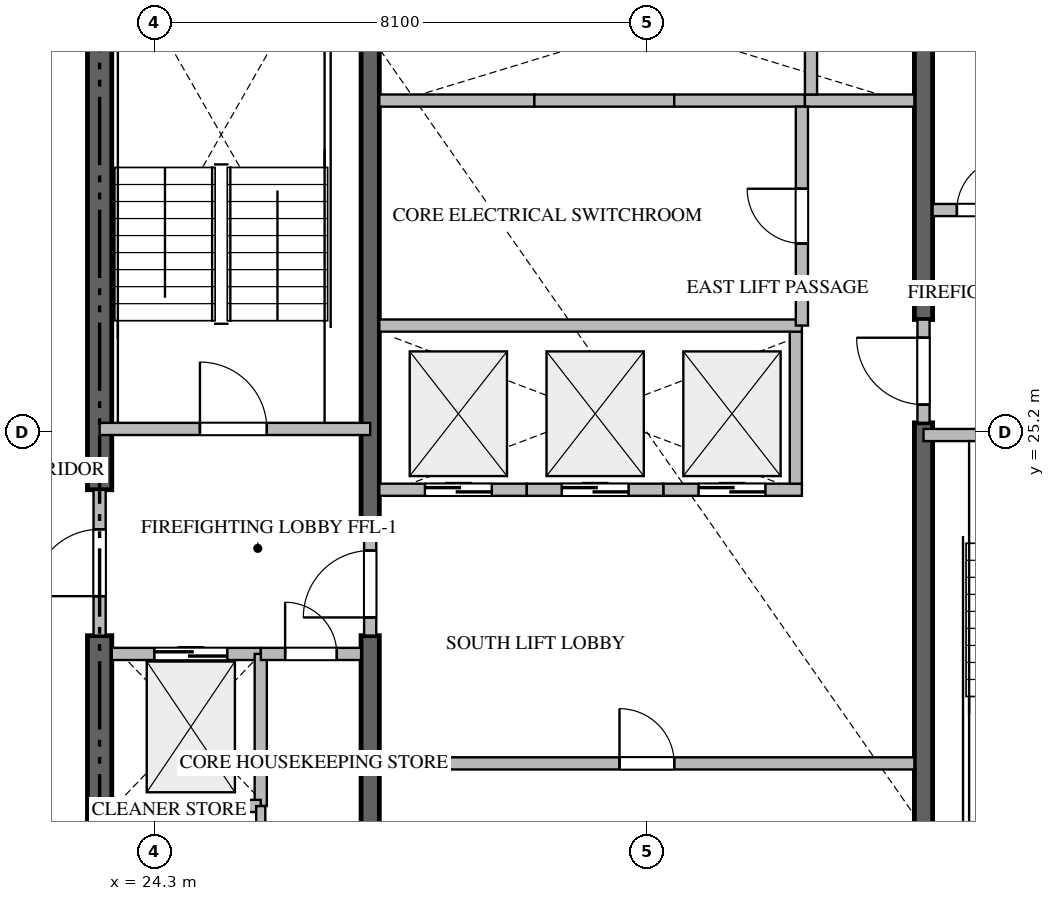
"""IFC4 building model, lengths in metres.
Left out: names, types, materials, properties, quantities, classifications, styles, units other than length and angle.
Written with IfcOpenShell. Run it as: python <this file> out.ifc"""

import sys

from ifc_helpers import new_model, si_unit, direction, frame, frame_2d, origin, place, context, subcontext, project, spatial, rectangle, extrude, source, transform, mapped, element, fill, save


model = new_model("IFC4")
c1 = context("Model", 3, precision=1e-05, world=origin(), true_north=direction((0.0, 1.0)))
c2 = subcontext(c1, "Body", "Model", "MODEL_VIEW")
j1 = project(units=[si_unit("LENGTHUNIT", "METRE"), si_unit("PLANEANGLEUNIT", "RADIAN")], contexts=[c1])
p1 = place(None, origin())
s1 = spatial("IfcSite", under=j1, at=p1, CompositionType="ELEMENT")
p2 = place(p1, origin())
s2 = spatial("IfcBuilding", under=s1, at=p2, CompositionType="ELEMENT")
p3 = place(p2, frame((0.0, 0.0, 127.65)))
s3 = spatial("IfcBuildingStorey", under=s2, at=p3, CompositionType="ELEMENT", Elevation=127.65)
p4 = place(p3, frame((23.4, 17.0, -0.26), z_axis=(0.0, 0.0, 1.0), x_axis=(0.0, 1.0, 0.0)))
e1 = element("IfcWall", 1, at=p4, inside=s3, PredefinedType="SHEAR", context=c2, shape_type="SweptSolid", body=[
    extrude(rectangle(XDim=4.85, YDim=0.4, at=frame_2d((2.425, 0.0))), origin(), (0.0, 0.0, 1.0), 3.748),
])
p5 = place(p3, frame((23.4, 24.25, -0.26), z_axis=(0.0, 0.0, 1.0), x_axis=(0.0, 1.0, 0.0)))
e2 = element("IfcWall", 2, at=p5, inside=s3, PredefinedType="SHEAR", context=c2, shape_type="SweptSolid", body=[
    extrude(rectangle(XDim=9.15, YDim=0.4, at=frame_2d((4.575, 0.0))), origin(), (0.0, 0.0, 1.0), 3.748),
])
p6 = place(p3, frame((27.85, 17.0, -0.26), z_axis=(0.0, 0.0, 1.0), x_axis=(0.0, 1.0, 0.0)))
e3 = element("IfcWall", 3, at=p6, inside=s3, PredefinedType="SHEAR", context=c2, shape_type="SweptSolid", body=[
    extrude(rectangle(XDim=4.85, YDim=0.3, at=frame_2d((2.425, 0.0))), origin(), (0.0, 0.0, 1.0), 3.748),
])
p7 = place(p3, frame((27.85, 23.55, -0.26), z_axis=(0.0, 0.0, 1.0), x_axis=(0.0, 1.0, 0.0)))
e4 = element("IfcWall", 4, at=p7, inside=s3, PredefinedType="SHEAR", context=c2, shape_type="SweptSolid", body=[
    extrude(rectangle(XDim=9.85, YDim=0.3, at=frame_2d((4.925, 0.0))), origin(), (0.0, 0.0, 1.0), 3.748),
])
p8 = place(p3, frame((36.95, 17.0, -0.26), z_axis=(0.0, 0.0, 1.0), x_axis=(0.0, 1.0, 0.0)))
e5 = element("IfcWall", 5, at=p8, inside=s3, PredefinedType="SHEAR", context=c2, shape_type="SweptSolid", body=[
    extrude(rectangle(XDim=8.35, YDim=0.3, at=frame_2d((4.175, 0.0))), origin(), (0.0, 0.0, 1.0), 3.748),
])
p9 = place(p3, frame((36.95, 27.05, -0.26), z_axis=(0.0, 0.0, 1.0), x_axis=(0.0, 1.0, 0.0)))
e6 = element("IfcWall", 6, at=p9, inside=s3, PredefinedType="SHEAR", context=c2, shape_type="SweptSolid", body=[
    extrude(rectangle(XDim=6.35, YDim=0.3, at=frame_2d((3.175, 0.0))), origin(), (0.0, 0.0, 1.0), 3.748),
])
p10 = place(p3, frame((23.4, 25.25, 0.0), z_axis=(0.0, 0.0, 1.0), x_axis=(1.0, 0.0, 0.0)))
e7 = element("IfcWall", 7, at=p10, inside=s3, PredefinedType="STANDARD", context=c2, shape_type="SweptSolid", body=[
    extrude(rectangle(XDim=4.45, YDim=0.2, at=frame_2d((2.225, 0.0))), origin(), (0.0, 0.0, 1.0), 3.49),
])
p11 = place(p10, frame((1.65, 0.0, 0.0)))
e8 = element("IfcOpeningElement", 8, at=p11, cuts=e7, PredefinedType="OPENING", context=c2, shape_type="SweptSolid", body=[
    extrude(rectangle(XDim=1.1, YDim=2.15, at=frame_2d((0.55, 1.075))), frame((0.0, 0.11, 0.0), z_axis=(0.0, -1.0, 0.0), x_axis=(1.0, 0.0, 0.0)), (0.0, 0.0, 1.0), 0.22),
])
p12 = place(p3, frame((36.95, 25.15, 0.0), z_axis=(0.0, 0.0, 1.0), x_axis=(1.0, 0.0, 0.0)))
e9 = element("IfcWall", 9, at=p12, inside=s3, PredefinedType="STANDARD", context=c2, shape_type="SweptSolid", body=[
    extrude(rectangle(XDim=4.45, YDim=0.2, at=frame_2d((2.225, 0.0))), origin(), (0.0, 0.0, 1.0), 3.49),
])
p13 = place(p12, frame((1.65, 0.0, 0.0)))
e10 = element("IfcOpeningElement", 10, at=p13, cuts=e9, PredefinedType="OPENING", context=c2, shape_type="SweptSolid", body=[
    extrude(rectangle(XDim=1.1, YDim=2.15, at=frame_2d((0.55, 1.075))), frame((0.0, 0.11, 0.0), z_axis=(0.0, -1.0, 0.0), x_axis=(1.0, 0.0, 0.0)), (0.0, 0.0, 1.0), 0.22),
])
p14 = place(p3, frame((23.6, 21.55, 0.0), z_axis=(0.0, 0.0, 1.0), x_axis=(1.0, 0.0, 0.0)))
e11 = element("IfcWall", 11, at=p14, inside=s3, PredefinedType="STANDARD", context=c2, shape_type="SweptSolid", body=[
    extrude(rectangle(XDim=2.45, YDim=0.2, at=frame_2d((1.225, 0.0))), origin(), (0.0, 0.0, 1.0), 3.49),
])
p15 = place(p14, frame((0.7, 0.0, 0.0)))
e12 = element("IfcOpeningElement", 12, at=p15, cuts=e11, PredefinedType="OPENING", context=c2, shape_type="SweptSolid", body=[
    extrude(rectangle(XDim=1.2, YDim=2.2, at=frame_2d((0.6, 1.1))), frame((0.0, 0.11, 0.0), z_axis=(0.0, -1.0, 0.0), x_axis=(1.0, 0.0, 0.0)), (0.0, 0.0, 1.0), 0.22),
])
p16 = place(p3, frame((28.0, 24.25, 0.0), z_axis=(0.0, 0.0, 1.0), x_axis=(1.0, 0.0, 0.0)))
e13 = element("IfcWall", 13, at=p16, inside=s3, PredefinedType="STANDARD", context=c2, shape_type="SweptSolid", body=[
    extrude(rectangle(XDim=2.425, YDim=0.2, at=frame_2d((1.212, 0.0))), origin(), (0.0, 0.0, 1.0), 3.49),
])
p17 = place(p16, frame((0.75, 0.0, 0.0)))
e14 = element("IfcOpeningElement", 14, at=p17, cuts=e13, PredefinedType="OPENING", context=c2, shape_type="SweptSolid", body=[
    extrude(rectangle(XDim=1.1, YDim=2.2, at=frame_2d((0.55, 1.1))), frame((0.0, 0.11, 0.0), z_axis=(0.0, -1.0, 0.0), x_axis=(1.0, 0.0, 0.0)), (0.0, 0.0, 1.0), 0.22),
])
p18 = place(p3, frame((30.425, 24.25, 0.0), z_axis=(0.0, 0.0, 1.0), x_axis=(1.0, 0.0, 0.0)))
e15 = element("IfcWall", 15, at=p18, inside=s3, PredefinedType="STANDARD", context=c2, shape_type="SweptSolid", body=[
    extrude(rectangle(XDim=2.25, YDim=0.2, at=frame_2d((1.125, 0.0))), origin(), (0.0, 0.0, 1.0), 3.49),
])
p19 = place(p18, frame((0.575, 0.0, 0.0)))
e16 = element("IfcOpeningElement", 16, at=p19, cuts=e15, PredefinedType="OPENING", context=c2, shape_type="SweptSolid", body=[
    extrude(rectangle(XDim=1.1, YDim=2.2, at=frame_2d((0.55, 1.1))), frame((0.0, 0.11, 0.0), z_axis=(0.0, -1.0, 0.0), x_axis=(1.0, 0.0, 0.0)), (0.0, 0.0, 1.0), 0.22),
])
p20 = place(p3, frame((32.675, 24.25, 0.0), z_axis=(0.0, 0.0, 1.0), x_axis=(1.0, 0.0, 0.0)))
e17 = element("IfcWall", 17, at=p20, inside=s3, PredefinedType="STANDARD", context=c2, shape_type="SweptSolid", body=[
    extrude(rectangle(XDim=2.275, YDim=0.2, at=frame_2d((1.137, 0.0))), origin(), (0.0, 0.0, 1.0), 3.49),
])
p21 = place(p20, frame((0.575, 0.0, 0.0)))
e18 = element("IfcOpeningElement", 18, at=p21, cuts=e17, PredefinedType="OPENING", context=c2, shape_type="SweptSolid", body=[
    extrude(rectangle(XDim=1.1, YDim=2.2, at=frame_2d((0.55, 1.1))), frame((0.0, 0.11, 0.0), z_axis=(0.0, -1.0, 0.0), x_axis=(1.0, 0.0, 0.0)), (0.0, 0.0, 1.0), 0.22),
])
p22 = place(p3, frame((34.85, 24.35, 0.0), z_axis=(0.0, 0.0, 1.0), x_axis=(0.0, 1.0, 0.0)))
e19 = element("IfcWall", 19, at=p22, inside=s3, PredefinedType="STANDARD", context=c2, shape_type="SweptSolid", body=[
    extrude(rectangle(XDim=2.5, YDim=0.2, at=frame_2d((1.25, 0.0))), origin(), (0.0, 0.0, 1.0), 3.49),
])
p23 = place(p3, frame((28.0, 30.65, 0.0), z_axis=(0.0, 0.0, 1.0), x_axis=(1.0, 0.0, 0.0)))
e20 = element("IfcWall", 20, at=p23, inside=s3, PredefinedType="STANDARD", context=c2, shape_type="SweptSolid", body=[
    extrude(rectangle(XDim=2.55, YDim=0.2, at=frame_2d((1.275, 0.0))), origin(), (0.0, 0.0, 1.0), 3.49),
])
p24 = place(p3, frame((30.55, 30.65, 0.0), z_axis=(0.0, 0.0, 1.0), x_axis=(1.0, 0.0, 0.0)))
e21 = element("IfcWall", 21, at=p24, inside=s3, PredefinedType="STANDARD", context=c2, shape_type="SweptSolid", body=[
    extrude(rectangle(XDim=2.3, YDim=0.2, at=frame_2d((1.15, 0.0))), origin(), (0.0, 0.0, 1.0), 3.49),
])
p25 = place(p3, frame((32.85, 30.65, 0.0), z_axis=(0.0, 0.0, 1.0), x_axis=(1.0, 0.0, 0.0)))
e22 = element("IfcWall", 22, at=p25, inside=s3, PredefinedType="STANDARD", context=c2, shape_type="SweptSolid", body=[
    extrude(rectangle(XDim=2.15, YDim=0.2, at=frame_2d((1.075, 0.0))), origin(), (0.0, 0.0, 1.0), 3.49),
])
p26 = place(p3, frame((35.0, 30.65, 0.0), z_axis=(0.0, 0.0, 1.0), x_axis=(1.0, 0.0, 0.0)))
e23 = element("IfcWall", 23, at=p26, inside=s3, PredefinedType="STANDARD", context=c2, shape_type="SweptSolid", body=[
    extrude(rectangle(XDim=1.8, YDim=0.2, at=frame_2d((0.9, 0.0))), origin(), (0.0, 0.0, 1.0), 3.49),
])
p27 = place(p3, frame((35.1, 30.75, 0.0), z_axis=(0.0, 0.0, 1.0), x_axis=(0.0, 1.0, 0.0)))
e24 = element("IfcWall", 24, at=p27, inside=s3, PredefinedType="STANDARD", context=c2, shape_type="SweptSolid", body=[
    extrude(rectangle(XDim=2.65, YDim=0.2, at=frame_2d((1.325, 0.0))), origin(), (0.0, 0.0, 1.0), 3.49),
])
p28 = place(p3, frame((26.05, 19.05, 0.0), z_axis=(0.0, 0.0, 1.0), x_axis=(0.0, 1.0, 0.0)))
e25 = element("IfcWall", 25, at=p28, inside=s3, PredefinedType="STANDARD", context=c2, shape_type="SweptSolid", body=[
    extrude(rectangle(XDim=2.5, YDim=0.2, at=frame_2d((1.25, 0.0))), origin(), (0.0, 0.0, 1.0), 3.49),
])
p29 = place(p3, frame((23.6, 19.05, 0.0), z_axis=(0.0, 0.0, 1.0), x_axis=(1.0, 0.0, 0.0)))
e26 = element("IfcWall", 26, at=p29, inside=s3, PredefinedType="STANDARD", context=c2, shape_type="SweptSolid", body=[
    extrude(rectangle(XDim=2.45, YDim=0.2, at=frame_2d((1.225, 0.0))), origin(), (0.0, 0.0, 1.0), 3.49),
])
p30 = place(p3, frame((26.052, 21.55, 0.0), z_axis=(0.0, 0.0, 1.0), x_axis=(1.0, 0.0, 0.0)))
e27 = element("IfcWall", 27, at=p30, inside=s3, PredefinedType="STANDARD", context=c2, shape_type="SweptSolid", body=[
    extrude(rectangle(XDim=1.648, YDim=0.2, at=frame_2d((0.824, 0.0))), origin(), (0.0, 0.0, 1.0), 3.49),
])
p31 = place(p30, frame((0.399, 0.0, 0.0)))
e28 = element("IfcOpeningElement", 28, at=p31, cuts=e27, PredefinedType="OPENING", context=c2, shape_type="SweptSolid", body=[
    extrude(rectangle(XDim=0.85, YDim=2.1, at=frame_2d((0.425, 1.05))), frame((0.0, 0.11, 0.0), z_axis=(0.0, -1.0, 0.0), x_axis=(1.0, 0.0, 0.0)), (0.0, 0.0, 1.0), 0.22),
])
p32 = place(p3, frame((37.1, 28.85, 0.0), z_axis=(0.0, 0.0, 1.0), x_axis=(1.0, 0.0, 0.0)))
e29 = element("IfcWall", 29, at=p32, inside=s3, PredefinedType="STANDARD", context=c2, shape_type="SweptSolid", body=[
    extrude(rectangle(XDim=1.648, YDim=0.2, at=frame_2d((0.824, 0.0))), origin(), (0.0, 0.0, 1.0), 3.49),
])
p33 = place(p32, frame((0.399, 0.0, 0.0)))
e30 = element("IfcOpeningElement", 30, at=p33, cuts=e29, PredefinedType="OPENING", context=c2, shape_type="SweptSolid", body=[
    extrude(rectangle(XDim=0.85, YDim=2.1, at=frame_2d((0.425, 1.05))), frame((0.0, 0.11, 0.0), z_axis=(0.0, -1.0, 0.0), x_axis=(1.0, 0.0, 0.0)), (0.0, 0.0, 1.0), 0.22),
])
p34 = place(p3, frame((23.4, 21.852, 0.0), z_axis=(0.0, 0.0, 1.0), x_axis=(0.0, 1.0, 0.0)))
e31 = element("IfcWall", 31, at=p34, inside=s3, PredefinedType="STANDARD", context=c2, shape_type="SweptSolid", body=[
    extrude(rectangle(XDim=2.396, YDim=0.2, at=frame_2d((1.198, 0.0))), origin(), (0.0, 0.0, 1.0), 3.49),
])
p35 = place(p34, frame((0.648, 0.0, 0.0)))
e32 = element("IfcOpeningElement", 32, at=p35, cuts=e31, PredefinedType="OPENING", context=c2, shape_type="SweptSolid", body=[
    extrude(rectangle(XDim=1.1, YDim=2.15, at=frame_2d((0.55, 1.075))), frame((0.0, 0.11, 0.0), z_axis=(0.0, -1.0, 0.0), x_axis=(1.0, 0.0, 0.0)), (0.0, 0.0, 1.0), 0.22),
])
p36 = place(p3, frame((27.85, 21.852, 0.0), z_axis=(0.0, 0.0, 1.0), x_axis=(0.0, 1.0, 0.0)))
e33 = element("IfcWall", 33, at=p36, inside=s3, PredefinedType="STANDARD", context=c2, shape_type="SweptSolid", body=[
    extrude(rectangle(XDim=1.696, YDim=0.2, at=frame_2d((0.848, 0.0))), origin(), (0.0, 0.0, 1.0), 3.49),
])
p37 = place(p36, frame((0.298, 0.0, 0.0)))
e34 = element("IfcOpeningElement", 34, at=p37, cuts=e33, PredefinedType="OPENING", context=c2, shape_type="SweptSolid", body=[
    extrude(rectangle(XDim=1.1, YDim=2.15, at=frame_2d((0.55, 1.075))), frame((0.0, 0.11, 0.0), z_axis=(0.0, -1.0, 0.0), x_axis=(1.0, 0.0, 0.0)), (0.0, 0.0, 1.0), 0.22),
])
p38 = place(p3, frame((36.95, 25.352, 0.0), z_axis=(0.0, 0.0, 1.0), x_axis=(0.0, 1.0, 0.0)))
e35 = element("IfcWall", 35, at=p38, inside=s3, PredefinedType="STANDARD", context=c2, shape_type="SweptSolid", body=[
    extrude(rectangle(XDim=1.696, YDim=0.2, at=frame_2d((0.848, 0.0))), origin(), (0.0, 0.0, 1.0), 3.49),
])
p39 = place(p38, frame((0.298, 0.0, 0.0)))
e36 = element("IfcOpeningElement", 36, at=p39, cuts=e35, PredefinedType="OPENING", context=c2, shape_type="SweptSolid", body=[
    extrude(rectangle(XDim=1.1, YDim=2.15, at=frame_2d((0.55, 1.075))), frame((0.0, 0.11, 0.0), z_axis=(0.0, -1.0, 0.0), x_axis=(1.0, 0.0, 0.0)), (0.0, 0.0, 1.0), 0.22),
])
p40 = place(p3, frame((28.0, 26.95, 0.0), z_axis=(0.0, 0.0, 1.0), x_axis=(1.0, 0.0, 0.0)))
e37 = element("IfcWall", 37, at=p40, inside=s3, PredefinedType="STANDARD", context=c2, shape_type="SweptSolid", body=[
    extrude(rectangle(XDim=6.95, YDim=0.2, at=frame_2d((3.475, 0.0))), origin(), (0.0, 0.0, 1.0), 3.49),
])
p41 = place(p3, frame((26.05, 17.0, 0.0), z_axis=(0.0, 0.0, 1.0), x_axis=(0.0, 1.0, 0.0)))
e38 = element("IfcWall", 38, at=p41, inside=s3, PredefinedType="PARTITIONING", context=c2, shape_type="SweptSolid", body=[
    extrude(rectangle(XDim=2.048, YDim=0.15, at=frame_2d((1.024, 0.0))), origin(), (0.0, 0.0, 1.0), 3.49),
])
p42 = place(p41, frame((0.599, 0.0, 0.0)))
e39 = element("IfcOpeningElement", 39, at=p42, cuts=e38, PredefinedType="OPENING", context=c2, shape_type="SweptSolid", body=[
    extrude(rectangle(XDim=0.85, YDim=2.1, at=frame_2d((0.425, 1.05))), frame((0.0, 0.085, 0.0), z_axis=(0.0, -1.0, 0.0), x_axis=(1.0, 0.0, 0.0)), (0.0, 0.0, 1.0), 0.17),
])
p43 = place(p3, frame((34.95, 26.95, 0.0), z_axis=(0.0, 0.0, 1.0), x_axis=(0.0, 1.0, 0.0)))
e40 = element("IfcWall", 40, at=p43, inside=s3, PredefinedType="STANDARD", context=c2, shape_type="SweptSolid", body=[
    extrude(rectangle(XDim=3.6, YDim=0.2, at=frame_2d((1.8, 0.0))), origin(), (0.0, 0.0, 1.0), 3.49),
])
p44 = place(p43, frame((1.35, 0.0, 0.0)))
e41 = element("IfcOpeningElement", 41, at=p44, cuts=e40, PredefinedType="OPENING", context=c2, shape_type="SweptSolid", body=[
    extrude(rectangle(XDim=0.9, YDim=2.1, at=frame_2d((0.45, 1.05))), frame((0.0, 0.11, 0.0), z_axis=(0.0, -1.0, 0.0), x_axis=(1.0, 0.0, 0.0)), (0.0, 0.0, 1.0), 0.22),
])
p45 = place(p3, frame((28.0, 19.75, 0.0), z_axis=(0.0, 0.0, 1.0), x_axis=(1.0, 0.0, 0.0)))
e42 = element("IfcWall", 42, at=p45, inside=s3, PredefinedType="STANDARD", context=c2, shape_type="SweptSolid", body=[
    extrude(rectangle(XDim=8.8, YDim=0.2, at=frame_2d((4.4, 0.0))), origin(), (0.0, 0.0, 1.0), 3.49),
])
p46 = place(p45, frame((3.95, 0.0, 0.0)))
e43 = element("IfcOpeningElement", 43, at=p46, cuts=e42, PredefinedType="OPENING", context=c2, shape_type="SweptSolid", body=[
    extrude(rectangle(XDim=0.9, YDim=2.1, at=frame_2d((0.45, 1.05))), frame((0.0, 0.11, 0.0), z_axis=(0.0, -1.0, 0.0), x_axis=(1.0, 0.0, 0.0)), (0.0, 0.0, 1.0), 0.22),
])
m1 = source(origin(), c2, "Body", "SweptSolid", [
    extrude(rectangle(XDim=1.1, YDim=2.15, at=frame_2d((0.55, 1.075))), frame((0.0, 0.025, 0.0), z_axis=(0.0, -1.0, 0.0), x_axis=(1.0, 0.0, 0.0)), (0.0, 0.0, 1.0), 0.05),
])
p47 = place(p11, origin())
e44 = element("IfcDoor", 44, at=p47, inside=s3, OperationType="SINGLE_SWING_LEFT", PredefinedType="DOOR", context=c2, shape_type="MappedRepresentation", body=[
    mapped(m1, transform((0.0, 0.0, 0.0), scale=1.0)),
])
fill(e8, e44)
m2 = source(origin(), c2, "Body", "SweptSolid", [
    extrude(rectangle(XDim=1.2, YDim=2.2, at=frame_2d((0.6, 1.1))), frame((0.0, 0.025, 0.0), z_axis=(0.0, -1.0, 0.0), x_axis=(1.0, 0.0, 0.0)), (0.0, 0.0, 1.0), 0.05),
])
p48 = place(p15, origin())
e45 = element("IfcDoor", 45, at=p48, inside=s3, OperationType="DOUBLE_DOOR_SLIDING", PredefinedType="DOOR", context=c2, shape_type="MappedRepresentation", body=[
    mapped(m2, transform((0.0, 0.0, 0.0), scale=1.0)),
])
fill(e12, e45)
m3 = source(origin(), c2, "Body", "SweptSolid", [
    extrude(rectangle(XDim=1.1, YDim=2.2, at=frame_2d((0.55, 1.1))), frame((0.0, 0.025, 0.0), z_axis=(0.0, -1.0, 0.0), x_axis=(1.0, 0.0, 0.0)), (0.0, 0.0, 1.0), 0.05),
])
p49 = place(p17, origin())
e46 = element("IfcDoor", 46, at=p49, inside=s3, OperationType="DOUBLE_DOOR_SLIDING", PredefinedType="DOOR", context=c2, shape_type="MappedRepresentation", body=[
    mapped(m3, transform((0.0, 0.0, 0.0), scale=1.0)),
])
fill(e14, e46)
p50 = place(p19, origin())
e47 = element("IfcDoor", 47, at=p50, inside=s3, OperationType="DOUBLE_DOOR_SLIDING", PredefinedType="DOOR", context=c2, shape_type="MappedRepresentation", body=[
    mapped(m3, transform((0.0, 0.0, 0.0), scale=1.0)),
])
fill(e16, e47)
p51 = place(p21, origin())
e48 = element("IfcDoor", 48, at=p51, inside=s3, OperationType="DOUBLE_DOOR_SLIDING", PredefinedType="DOOR", context=c2, shape_type="MappedRepresentation", body=[
    mapped(m3, transform((0.0, 0.0, 0.0), scale=1.0)),
])
fill(e18, e48)
m4 = source(origin(), c2, "Body", "SweptSolid", [
    extrude(rectangle(XDim=0.85, YDim=2.1, at=frame_2d((0.425, 1.05))), frame((0.0, 0.025, 0.0), z_axis=(0.0, -1.0, 0.0), x_axis=(1.0, 0.0, 0.0)), (0.0, 0.0, 1.0), 0.05),
])
p52 = place(p31, origin())
e49 = element("IfcDoor", 49, at=p52, inside=s3, OperationType="SINGLE_SWING_LEFT", PredefinedType="DOOR", context=c2, shape_type="MappedRepresentation", body=[
    mapped(m4, transform((0.0, 0.0, 0.0), scale=1.0)),
])
fill(e28, e49)
p53 = place(p33, origin())
e50 = element("IfcDoor", 50, at=p53, inside=s3, OperationType="SINGLE_SWING_RIGHT", PredefinedType="DOOR", context=c2, shape_type="MappedRepresentation", body=[
    mapped(m4, transform((0.0, 0.0, 0.0), scale=1.0)),
])
fill(e30, e50)
p54 = place(p35, origin())
e51 = element("IfcDoor", 51, at=p54, inside=s3, OperationType="SINGLE_SWING_LEFT", PredefinedType="DOOR", context=c2, shape_type="MappedRepresentation", body=[
    mapped(m1, transform((0.0, 0.0, 0.0), scale=1.0)),
])
fill(e32, e51)
p55 = place(p37, origin())
e52 = element("IfcDoor", 52, at=p55, inside=s3, OperationType="SINGLE_SWING_LEFT", PredefinedType="DOOR", context=c2, shape_type="MappedRepresentation", body=[
    mapped(m1, transform((0.0, 0.0, 0.0), scale=1.0)),
])
fill(e34, e52)
p56 = place(p39, origin())
e53 = element("IfcDoor", 53, at=p56, inside=s3, OperationType="SINGLE_SWING_RIGHT", PredefinedType="DOOR", context=c2, shape_type="MappedRepresentation", body=[
    mapped(m1, transform((0.0, 0.0, 0.0), scale=1.0)),
])
fill(e36, e53)
m5 = source(origin(), c2, "Body", "SweptSolid", [
    extrude(rectangle(XDim=0.9, YDim=2.1, at=frame_2d((0.45, 1.05))), frame((0.0, 0.025, 0.0), z_axis=(0.0, -1.0, 0.0), x_axis=(1.0, 0.0, 0.0)), (0.0, 0.0, 1.0), 0.05),
])
p57 = place(p44, origin())
e54 = element("IfcDoor", 54, at=p57, inside=s3, OperationType="SINGLE_SWING_RIGHT", PredefinedType="DOOR", context=c2, shape_type="MappedRepresentation", body=[
    mapped(m5, transform((0.0, 0.0, 0.0), scale=1.0)),
])
fill(e41, e54)
p58 = place(p46, origin())
e55 = element("IfcDoor", 55, at=p58, inside=s3, OperationType="SINGLE_SWING_LEFT", PredefinedType="DOOR", context=c2, shape_type="MappedRepresentation", body=[
    mapped(m5, transform((0.0, 0.0, 0.0), scale=1.0)),
])
fill(e43, e55)
save(model, sys.argv[1])
